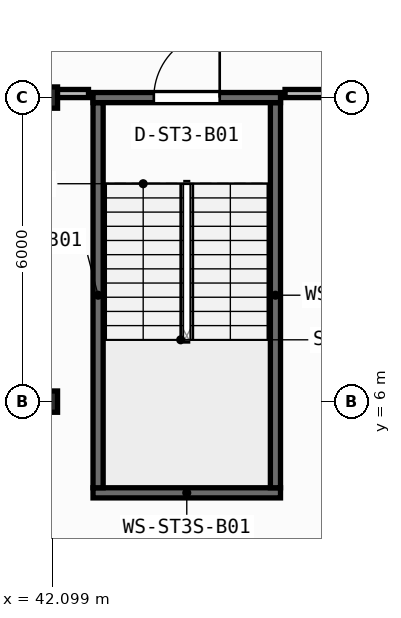
"""IFC4 building model, lengths in metres.
Left out: names, types, materials, properties, quantities, classifications, styles, units other than length and angle.
Written with IfcOpenShell. Run it as: python <this file> out.ifc"""

import sys

from ifc_helpers import new_model, si_unit, direction, frame, frame_2d, origin, origin_2d, place, context, subcontext, project, spatial, rectangle, i_section, extrude, element, fill, save


model = new_model("IFC4")
c1 = context("Model", 3, precision=1e-05, world=origin(), true_north=direction((0.0, 1.0)))
c2 = subcontext(c1, "Body", "Model", "MODEL_VIEW")
j1 = project(units=[si_unit("LENGTHUNIT", "METRE"), si_unit("PLANEANGLEUNIT", "RADIAN")], contexts=[c1])
p1 = place(None, origin())
s1 = spatial("IfcSite", under=j1, at=p1, CompositionType="ELEMENT")
p2 = place(p1, origin())
s2 = spatial("IfcBuilding", under=s1, at=p2, CompositionType="ELEMENT")
p3 = place(p2, frame((0.0, 0.0, -4.5)))
s3 = spatial("IfcBuildingStorey", under=s2, at=p3, CompositionType="ELEMENT", Elevation=-4.5)
for number, where, z_axis, x_axis in (
    (1, (42.0, 6.0, 0.0), (0.0, 0.0, 1.0), (1.0, 0.0, 0.0)),
    (2, (42.0, 12.0, 0.0), (0.0, 0.0, 1.0), (1.0, 0.0, 0.0)),
):
    element("IfcColumn", number, at=place(p3, frame(where, z_axis=z_axis, x_axis=x_axis)), inside=s3, PredefinedType="COLUMN", context=c2, shape_type="SweptSolid", body=[
        extrude(i_section(OverallWidth=0.4, OverallDepth=0.42, WebThickness=0.025, FlangeThickness=0.04, at=origin_2d()), origin(), (0.0, 0.0, 1.0), 4.5),
    ])
p4 = place(p3, frame((42.9, 4.2, 0.0), z_axis=(0.0, 0.0, 1.0), x_axis=(1.0, 0.0, 0.0)))
e3 = element("IfcWall", 3, at=p4, inside=s3, PredefinedType="SHEAR", context=c2, shape_type="SweptSolid", body=[
    extrude(rectangle(XDim=3.7, YDim=0.2, at=frame_2d((1.85, 0.0))), origin(), (0.0, 0.0, 1.0), 4.25),
])
for number, where, z_axis, x_axis in (
    (4, (43.0, 4.3, 0.0), (0.0, 0.0, 1.0), (0.0, 1.0, 0.0)),
    (5, (46.5, 4.3, 0.0), (0.0, 0.0, 1.0), (0.0, 1.0, 0.0)),
):
    element("IfcWall", number, at=place(p3, frame(where, z_axis=z_axis, x_axis=x_axis)), inside=s3, PredefinedType="SHEAR", context=c2, shape_type="SweptSolid", body=[
        extrude(rectangle(XDim=7.6, YDim=0.2, at=frame_2d((3.8, 0.0))), origin(), (0.0, 0.0, 1.0), 4.25),
    ])
p5 = place(p3, frame((42.9, 12.0, 0.0), z_axis=(0.0, 0.0, 1.0), x_axis=(1.0, 0.0, 0.0)))
e6 = element("IfcWall", 6, at=p5, inside=s3, PredefinedType="SHEAR", context=c2, shape_type="SweptSolid", body=[
    extrude(rectangle(XDim=3.7, YDim=0.2, at=frame_2d((1.85, 0.0))), origin(), (0.0, 0.0, 1.0), 4.25),
])
p6 = place(p5, frame((1.2, 0.0, 0.0)))
e7 = element("IfcOpeningElement", 7, at=p6, cuts=e6, PredefinedType="OPENING", context=c2, shape_type="SweptSolid", body=[
    extrude(rectangle(XDim=1.3, YDim=2.15, at=frame_2d((0.65, 1.075))), frame((0.0, 0.11, 0.0), z_axis=(0.0, -1.0, 0.0), x_axis=(1.0, 0.0, 0.0)), (0.0, 0.0, 1.0), 0.22),
])
p7 = place(p3, frame((38.659, 12.08, 0.0), z_axis=(0.0, 0.0, 1.0), x_axis=(1.0, 0.0, 0.0)))
e8 = element("IfcWall", 8, at=p7, inside=s3, PredefinedType="PARTITIONING", context=c2, shape_type="SweptSolid", body=[
    extrude(rectangle(XDim=4.151, YDim=0.16, at=frame_2d((2.076, 0.0))), origin(), (0.0, 0.0, 1.0), 3.315),
])
p8 = place(p3, frame((46.689, 12.08, 0.0), z_axis=(0.0, 0.0, 1.0), x_axis=(1.0, 0.0, 0.0)))
e9 = element("IfcWall", 9, at=p8, inside=s3, PredefinedType="PARTITIONING", context=c2, shape_type="SweptSolid", body=[
    extrude(rectangle(XDim=2.843, YDim=0.16, at=frame_2d((1.421, 0.0))), origin(), (0.0, 0.0, 1.0), 3.315),
])
p9 = place(p6, origin())
e10 = element("IfcDoor", 10, at=p9, inside=s3, OperationType="SINGLE_SWING_RIGHT", PredefinedType="DOOR", context=c2, shape_type="SweptSolid", body=[
    extrude(rectangle(XDim=1.3, YDim=2.15, at=frame_2d((0.65, 1.075))), frame((0.0, 0.025, 0.0), z_axis=(0.0, -1.0, 0.0), x_axis=(1.0, 0.0, 0.0)), (0.0, 0.0, 1.0), 0.05),
])
fill(e7, e10)
save(model, sys.argv[1])
